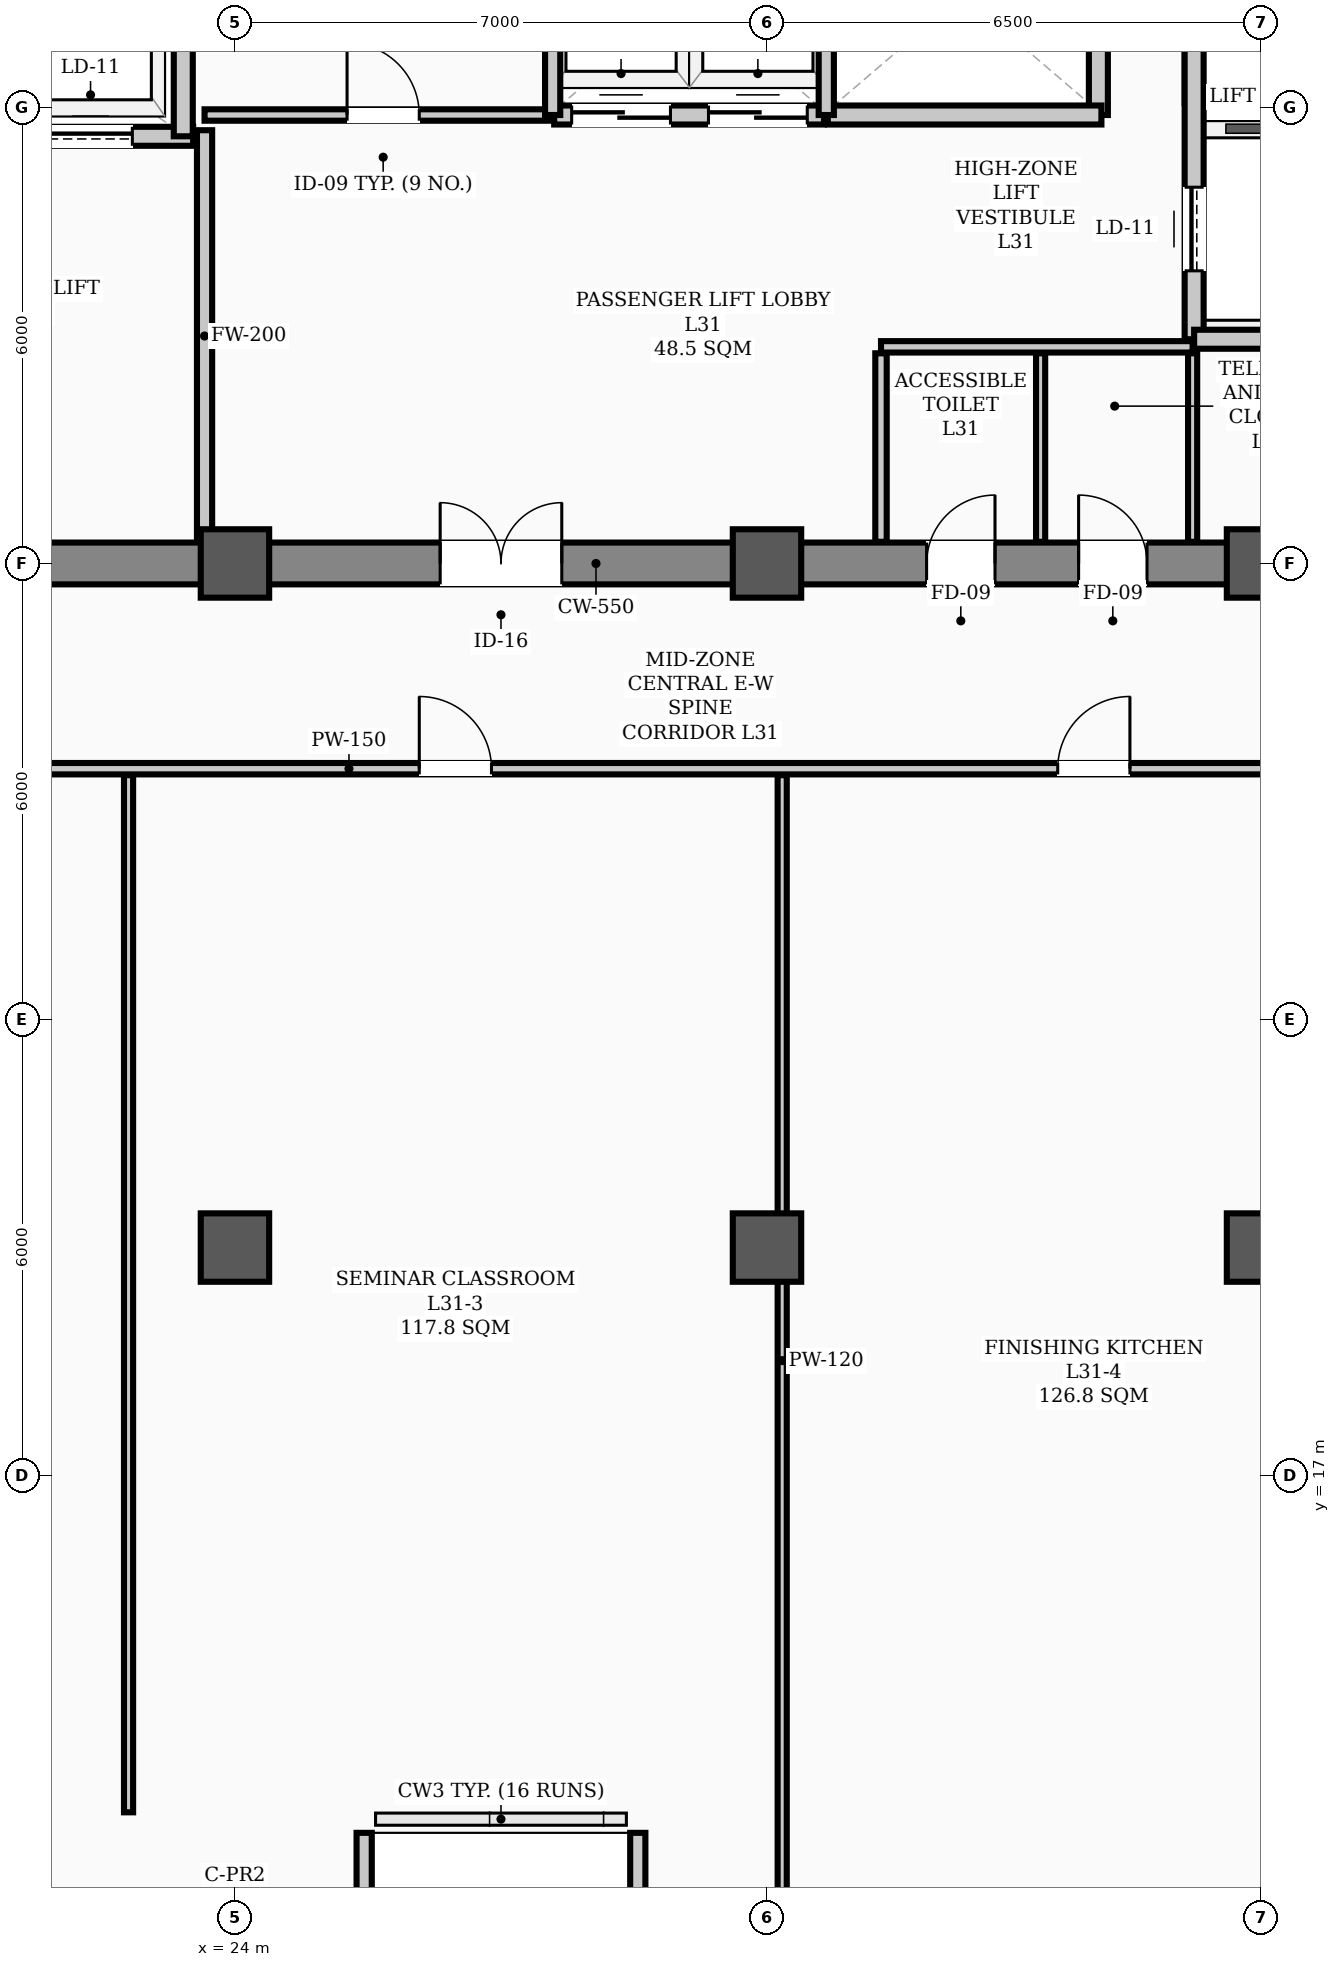
"""IFC4 building model, lengths in metres.
Left out: names, types, materials, properties, quantities, classifications, styles, units other than length and angle.
Written with IfcOpenShell. Run it as: python <this file> out.ifc"""

import sys

from ifc_helpers import new_model, si_unit, direction, frame, frame_2d, origin, origin_2d, place, context, subcontext, project, spatial, rectangle, hollow_rectangle, extrude, element, fill, save


model = new_model("IFC4")
c1 = context("Model", 3, precision=1e-05, world=origin(), true_north=direction((0.0, 1.0)))
c2 = subcontext(c1, "Body", "Model", "MODEL_VIEW")
j1 = project(units=[si_unit("LENGTHUNIT", "METRE"), si_unit("PLANEANGLEUNIT", "RADIAN")], contexts=[c1])
p1 = place(None, origin())
s1 = spatial("IfcSite", under=j1, at=p1, CompositionType="ELEMENT")
p2 = place(p1, origin())
s2 = spatial("IfcBuilding", under=s1, at=p2, CompositionType="ELEMENT")
p3 = place(p2, frame((0.0, 0.0, 126.6)))
s3 = spatial("IfcBuildingStorey", under=s2, at=p3, CompositionType="ELEMENT", Elevation=126.6)
for number, where, z_axis, x_axis in (
    (1, (24.0, 29.0, 0.0), (0.0, 0.0, 1.0), (1.0, 0.0, 0.0)),
    (2, (31.0, 29.0, 0.0), (0.0, 0.0, 1.0), (1.0, 0.0, 0.0)),
    (3, (37.5, 29.0, 0.0), (0.0, 0.0, 1.0), (1.0, 0.0, 0.0)),
    (4, (24.0, 20.0, 0.0), (0.0, 0.0, 1.0), (1.0, 0.0, 0.0)),
    (5, (31.0, 20.0, 0.0), (0.0, 0.0, 1.0), (1.0, 0.0, 0.0)),
    (6, (37.5, 20.0, 0.0), (0.0, 0.0, 1.0), (1.0, 0.0, 0.0)),
):
    element("IfcColumn", number, at=place(p3, frame(where, z_axis=z_axis, x_axis=x_axis)), inside=s3, PredefinedType="COLUMN", context=c2, shape_type="SweptSolid", body=[
        extrude(hollow_rectangle(XDim=0.9, YDim=0.9, WallThickness=0.035, InnerFilletRadius=0.017, OuterFilletRadius=0.052, at=origin_2d()), origin(), (0.0, 0.0, 1.0), 3.9),
    ])
for number, where, z_axis, x_axis in (
    (7, (25.7, 10.6, 0.0), (0.0, 0.0, 1.0), (0.0, 1.0, 0.0)),
    (8, (29.3, 12.3, 0.0), (0.0, 0.0, 1.0), (0.0, -1.0, 0.0)),
):
    element("IfcWall", number, at=place(p3, frame(where, z_axis=z_axis, x_axis=x_axis)), inside=s3, PredefinedType="PARAPET", context=c2, shape_type="SweptSolid", body=[
        extrude(rectangle(XDim=1.7, YDim=0.2, at=frame_2d((0.85, 0.0))), origin(), (0.0, 0.0, 1.0), 1.2),
    ])
p4 = place(p3, frame((13.5, 29.0, 0.0), z_axis=(0.0, 0.0, 1.0), x_axis=(1.0, 0.0, 0.0)))
e9 = element("IfcWall", 9, at=p4, inside=s3, PredefinedType="SHEAR", context=c2, shape_type="SweptSolid", body=[
    extrude(rectangle(XDim=30.5, YDim=0.55, at=frame_2d((15.25, 0.0))), origin(), (0.0, 0.0, 1.0), 3.72),
])
p5 = place(p4, frame((1.75, 0.0, 0.0)))
e10 = element("IfcOpeningElement", 10, at=p5, cuts=e9, PredefinedType="OPENING", context=c2, shape_type="SweptSolid", body=[
    extrude(rectangle(XDim=1.1, YDim=2.08, at=frame_2d((0.55, 1.04))), frame((0.0, 0.285, 0.0), z_axis=(0.0, -1.0, 0.0), x_axis=(1.0, 0.0, 0.0)), (0.0, 0.0, 1.0), 0.57),
])
p6 = place(p4, frame((26.7, 0.0, 0.0)))
e11 = element("IfcOpeningElement", 11, at=p6, cuts=e9, PredefinedType="OPENING", context=c2, shape_type="SweptSolid", body=[
    extrude(rectangle(XDim=1.1, YDim=2.08, at=frame_2d((0.55, 1.04))), frame((0.0, 0.285, 0.0), z_axis=(0.0, -1.0, 0.0), x_axis=(1.0, 0.0, 0.0)), (0.0, 0.0, 1.0), 0.57),
])
p7 = place(p4, frame((6.8, 0.0, 0.0)))
e12 = element("IfcOpeningElement", 12, at=p7, cuts=e9, PredefinedType="OPENING", context=c2, shape_type="SweptSolid", body=[
    extrude(rectangle(XDim=1.1, YDim=2.08, at=frame_2d((0.55, 1.04))), frame((0.0, 0.285, 0.0), z_axis=(0.0, -1.0, 0.0), x_axis=(1.0, 0.0, 0.0)), (0.0, 0.0, 1.0), 0.57),
])
p8 = place(p4, frame((13.2, 0.0, 0.0)))
e13 = element("IfcOpeningElement", 13, at=p8, cuts=e9, PredefinedType="OPENING", context=c2, shape_type="SweptSolid", body=[
    extrude(rectangle(XDim=1.6, YDim=2.08, at=frame_2d((0.8, 1.04))), frame((0.0, 0.285, 0.0), z_axis=(0.0, -1.0, 0.0), x_axis=(1.0, 0.0, 0.0)), (0.0, 0.0, 1.0), 0.57),
])
p9 = place(p4, frame((19.6, 0.0, 0.0)))
e14 = element("IfcOpeningElement", 14, at=p9, cuts=e9, PredefinedType="OPENING", context=c2, shape_type="SweptSolid", body=[
    extrude(rectangle(XDim=0.9, YDim=2.08, at=frame_2d((0.45, 1.04))), frame((0.0, 0.285, 0.0), z_axis=(0.0, -1.0, 0.0), x_axis=(1.0, 0.0, 0.0)), (0.0, 0.0, 1.0), 0.57),
])
p10 = place(p4, frame((21.6, 0.0, 0.0)))
e15 = element("IfcOpeningElement", 15, at=p10, cuts=e9, PredefinedType="OPENING", context=c2, shape_type="SweptSolid", body=[
    extrude(rectangle(XDim=0.9, YDim=2.08, at=frame_2d((0.45, 1.04))), frame((0.0, 0.285, 0.0), z_axis=(0.0, -1.0, 0.0), x_axis=(1.0, 0.0, 0.0)), (0.0, 0.0, 1.0), 0.57),
])
p11 = place(p3, frame((18.1, 34.62, 0.0), z_axis=(0.0, 0.0, 1.0), x_axis=(1.0, 0.0, 0.0)))
e16 = element("IfcWall", 16, at=p11, inside=s3, PredefinedType="STANDARD", context=c2, shape_type="SweptSolid", body=[
    extrude(rectangle(XDim=5.35, YDim=0.25, at=frame_2d((2.675, 0.0))), origin(), (0.0, 0.0, 1.0), 3.72),
])
p12 = place(p11, frame((0.85, 0.0, 0.0)))
e17 = element("IfcOpeningElement", 17, at=p12, cuts=e16, PredefinedType="OPENING", context=c2, shape_type="SweptSolid", body=[
    extrude(rectangle(XDim=1.1, YDim=2.08, at=frame_2d((0.55, 1.04))), frame((0.0, 0.135, 0.0), z_axis=(0.0, -1.0, 0.0), x_axis=(1.0, 0.0, 0.0)), (0.0, 0.0, 1.0), 0.27),
])
p13 = place(p11, frame((3.45, 0.0, 0.0)))
e18 = element("IfcOpeningElement", 18, at=p13, cuts=e16, PredefinedType="OPENING", context=c2, shape_type="SweptSolid", body=[
    extrude(rectangle(XDim=1.1, YDim=2.08, at=frame_2d((0.55, 1.04))), frame((0.0, 0.135, 0.0), z_axis=(0.0, -1.0, 0.0), x_axis=(1.0, 0.0, 0.0)), (0.0, 0.0, 1.0), 0.27),
])
p14 = place(p3, frame((36.62, 31.95, 0.0), z_axis=(0.0, 0.0, 1.0), x_axis=(0.0, 1.0, 0.0)))
e19 = element("IfcWall", 19, at=p14, inside=s3, PredefinedType="STANDARD", context=c2, shape_type="SweptSolid", body=[
    extrude(rectangle(XDim=6.0, YDim=0.25, at=frame_2d((3.0, 0.0))), origin(), (0.0, 0.0, 1.0), 3.72),
])
p15 = place(p14, frame((0.9, 0.0, 0.0)))
e20 = element("IfcOpeningElement", 20, at=p15, cuts=e19, PredefinedType="OPENING", context=c2, shape_type="SweptSolid", body=[
    extrude(rectangle(XDim=1.1, YDim=2.08, at=frame_2d((0.55, 1.04))), frame((0.0, 0.135, 0.0), z_axis=(0.0, -1.0, 0.0), x_axis=(1.0, 0.0, 0.0)), (0.0, 0.0, 1.0), 0.27),
])
p16 = place(p14, frame((4.0, 0.0, 0.0)))
e21 = element("IfcOpeningElement", 21, at=p16, cuts=e19, PredefinedType="OPENING", context=c2, shape_type="SweptSolid", body=[
    extrude(rectangle(XDim=1.1, YDim=2.08, at=frame_2d((0.55, 1.04))), frame((0.0, 0.135, 0.0), z_axis=(0.0, -1.0, 0.0), x_axis=(1.0, 0.0, 0.0)), (0.0, 0.0, 1.0), 0.27),
])
p17 = place(p3, frame((36.62, 31.95, 0.0), z_axis=(0.0, 0.0, 1.0), x_axis=(1.0, 0.0, 0.0)))
e22 = element("IfcWall", 22, at=p17, inside=s3, PredefinedType="STANDARD", context=c2, shape_type="SweptSolid", body=[
    extrude(rectangle(XDim=1.9, YDim=0.25, at=frame_2d((0.95, 0.0))), origin(), (0.0, 0.0, 1.0), 3.48),
])
p18 = place(p3, frame((23.32, 34.62, 0.0), z_axis=(0.0, 0.0, 1.0), x_axis=(0.0, 1.0, 0.0)))
e23 = element("IfcWall", 23, at=p18, inside=s3, PredefinedType="STANDARD", context=c2, shape_type="SweptSolid", body=[
    extrude(rectangle(XDim=3.33, YDim=0.25, at=frame_2d((1.665, 0.0))), origin(), (0.0, 0.0, 1.0), 3.72),
])
p19 = place(p3, frame((35.36, 34.9, 0.0), z_axis=(0.0, 0.0, 1.0), x_axis=(0.0, 1.0, 0.0)))
e24 = element("IfcWall", 24, at=p19, inside=s3, PredefinedType="STANDARD", context=c2, shape_type="SweptSolid", body=[
    extrude(rectangle(XDim=3.05, YDim=0.25, at=frame_2d((1.525, 0.0))), origin(), (0.0, 0.0, 1.0), 3.72),
])
p20 = place(p3, frame((28.2, 34.9, 0.0), z_axis=(0.0, 0.0, 1.0), x_axis=(1.0, 0.0, 0.0)))
e25 = element("IfcWall", 25, at=p20, inside=s3, PredefinedType="STANDARD", context=c2, shape_type="SweptSolid", body=[
    extrude(rectangle(XDim=3.55, YDim=0.25, at=frame_2d((1.775, 0.0))), origin(), (0.0, 0.0, 1.0), 3.72),
])
p21 = place(p20, frame((0.23, 0.0, 0.0)))
e26 = element("IfcOpeningElement", 26, at=p21, cuts=e25, PredefinedType="OPENING", context=c2, shape_type="SweptSolid", body=[
    extrude(rectangle(XDim=1.3, YDim=2.08, at=frame_2d((0.65, 1.04))), frame((0.0, 0.135, 0.0), z_axis=(0.0, -1.0, 0.0), x_axis=(1.0, 0.0, 0.0)), (0.0, 0.0, 1.0), 0.27),
])
p22 = place(p20, frame((2.03, 0.0, 0.0)))
e27 = element("IfcOpeningElement", 27, at=p22, cuts=e25, PredefinedType="OPENING", context=c2, shape_type="SweptSolid", body=[
    extrude(rectangle(XDim=1.3, YDim=2.08, at=frame_2d((0.65, 1.04))), frame((0.0, 0.135, 0.0), z_axis=(0.0, -1.0, 0.0), x_axis=(1.0, 0.0, 0.0)), (0.0, 0.0, 1.0), 0.27),
])
p23 = place(p3, frame((31.8, 34.9, 0.0), z_axis=(0.0, 0.0, 1.0), x_axis=(1.0, 0.0, 0.0)))
e28 = element("IfcWall", 28, at=p23, inside=s3, PredefinedType="STANDARD", context=c2, shape_type="SweptSolid", body=[
    extrude(rectangle(XDim=3.6, YDim=0.25, at=frame_2d((1.8, 0.0))), origin(), (0.0, 0.0, 1.0), 3.72),
])
p24 = place(p3, frame((23.6, 34.9, 0.0), z_axis=(0.0, 0.0, 1.0), x_axis=(1.0, 0.0, 0.0)))
e29 = element("IfcWall", 29, at=p24, inside=s3, PredefinedType="PARTITIONING", context=c2, shape_type="SweptSolid", body=[
    extrude(rectangle(XDim=4.58, YDim=0.15, at=frame_2d((2.29, 0.0))), origin(), (0.0, 0.0, 1.0), 3.72),
])
p25 = place(p24, frame((1.875, 0.0, 0.0)))
e30 = element("IfcOpeningElement", 30, at=p25, cuts=e29, PredefinedType="OPENING", context=c2, shape_type="SweptSolid", body=[
    extrude(rectangle(XDim=0.95, YDim=2.08, at=frame_2d((0.475, 1.04))), frame((0.0, 0.085, 0.0), z_axis=(0.0, -1.0, 0.0), x_axis=(1.0, 0.0, 0.0)), (0.0, 0.0, 1.0), 0.17),
])
p26 = place(p3, frame((32.5, 31.85, 0.0), z_axis=(0.0, 0.0, 1.0), x_axis=(1.0, 0.0, 0.0)))
e31 = element("IfcWall", 31, at=p26, inside=s3, PredefinedType="PARTITIONING", context=c2, shape_type="SweptSolid", body=[
    extrude(rectangle(XDim=4.1, YDim=0.15, at=frame_2d((2.05, 0.0))), origin(), (0.0, 0.0, 1.0), 3.72),
])
p27 = place(p3, frame((2.31, 26.3, 0.0), z_axis=(0.0, 0.0, 1.0), x_axis=(1.0, 0.0, 0.0)))
e32 = element("IfcWall", 32, at=p27, inside=s3, PredefinedType="PARTITIONING", context=c2, shape_type="SweptSolid", body=[
    extrude(rectangle(XDim=46.38, YDim=0.15, at=frame_2d((23.19, 0.0))), origin(), (0.0, 0.0, 1.0), 3.1),
])
p28 = place(p27, frame((10.19, 0.0, 0.0)))
e33 = element("IfcOpeningElement", 33, at=p28, cuts=e32, PredefinedType="OPENING", context=c2, shape_type="SweptSolid", body=[
    extrude(rectangle(XDim=0.95, YDim=2.08, at=frame_2d((0.475, 1.04))), frame((0.0, 0.085, 0.0), z_axis=(0.0, -1.0, 0.0), x_axis=(1.0, 0.0, 0.0)), (0.0, 0.0, 1.0), 0.17),
])
p29 = place(p27, frame((15.915, 0.0, 0.0)))
e34 = element("IfcOpeningElement", 34, at=p29, cuts=e32, PredefinedType="OPENING", context=c2, shape_type="SweptSolid", body=[
    extrude(rectangle(XDim=0.95, YDim=2.08, at=frame_2d((0.475, 1.04))), frame((0.0, 0.085, 0.0), z_axis=(0.0, -1.0, 0.0), x_axis=(1.0, 0.0, 0.0)), (0.0, 0.0, 1.0), 0.17),
])
p30 = place(p27, frame((24.115, 0.0, 0.0)))
e35 = element("IfcOpeningElement", 35, at=p30, cuts=e32, PredefinedType="OPENING", context=c2, shape_type="SweptSolid", body=[
    extrude(rectangle(XDim=0.95, YDim=2.08, at=frame_2d((0.475, 1.04))), frame((0.0, 0.085, 0.0), z_axis=(0.0, -1.0, 0.0), x_axis=(1.0, 0.0, 0.0)), (0.0, 0.0, 1.0), 0.17),
])
p31 = place(p27, frame((32.515, 0.0, 0.0)))
e36 = element("IfcOpeningElement", 36, at=p31, cuts=e32, PredefinedType="OPENING", context=c2, shape_type="SweptSolid", body=[
    extrude(rectangle(XDim=0.95, YDim=2.08, at=frame_2d((0.475, 1.04))), frame((0.0, 0.085, 0.0), z_axis=(0.0, -1.0, 0.0), x_axis=(1.0, 0.0, 0.0)), (0.0, 0.0, 1.0), 0.17),
])
p32 = place(p27, frame((37.665, 0.0, 0.0)))
e37 = element("IfcOpeningElement", 37, at=p32, cuts=e32, PredefinedType="OPENING", context=c2, shape_type="SweptSolid", body=[
    extrude(rectangle(XDim=0.95, YDim=2.08, at=frame_2d((0.475, 1.04))), frame((0.0, 0.085, 0.0), z_axis=(0.0, -1.0, 0.0), x_axis=(1.0, 0.0, 0.0)), (0.0, 0.0, 1.0), 0.17),
])
p33 = place(p3, frame((23.6, 29.285, 0.0), z_axis=(0.0, 0.0, 1.0), x_axis=(0.0, 1.0, 0.0)))
e38 = element("IfcWall", 38, at=p33, inside=s3, PredefinedType="STANDARD", context=c2, shape_type="SweptSolid", body=[
    extrude(rectangle(XDim=5.415, YDim=0.2, at=frame_2d((2.708, 0.0))), origin(), (0.0, 0.0, 1.0), 3.1),
])
p34 = place(p3, frame((32.5, 29.285, 0.0), z_axis=(0.0, 0.0, 1.0), x_axis=(0.0, 1.0, 0.0)))
e39 = element("IfcWall", 39, at=p34, inside=s3, PredefinedType="PARTITIONING", context=c2, shape_type="SweptSolid", body=[
    extrude(rectangle(XDim=2.48, YDim=0.15, at=frame_2d((1.24, 0.0))), origin(), (0.0, 0.0, 1.0), 3.3),
])
for number, where, z_axis, x_axis in (
    (40, (36.6, 29.285, 0.0), (0.0, 0.0, 1.0), (0.0, 1.0, 0.0)),
    (41, (34.6, 29.285, 0.0), (0.0, 0.0, 1.0), (0.0, 1.0, 0.0)),
):
    element("IfcWall", number, at=place(p3, frame(where, z_axis=z_axis, x_axis=x_axis)), inside=s3, PredefinedType="PARTITIONING", context=c2, shape_type="SweptSolid", body=[
        extrude(rectangle(XDim=2.48, YDim=0.12, at=frame_2d((1.24, 0.0))), origin(), (0.0, 0.0, 1.0), 3.3),
    ])
p35 = place(p3, frame((22.6, 12.57, 0.0), z_axis=(0.0, 0.0, 1.0), x_axis=(0.0, 1.0, 0.0)))
e42 = element("IfcWall", 42, at=p35, inside=s3, PredefinedType="PARTITIONING", context=c2, shape_type="SweptSolid", body=[
    extrude(rectangle(XDim=13.645, YDim=0.12, at=frame_2d((6.823, 0.0))), origin(), (0.0, 0.0, 1.0), 3.0),
])
p36 = place(p3, frame((31.2, 10.81, 0.0), z_axis=(0.0, 0.0, 1.0), x_axis=(0.0, 1.0, 0.0)))
e43 = element("IfcWall", 43, at=p36, inside=s3, PredefinedType="PARTITIONING", context=c2, shape_type="SweptSolid", body=[
    extrude(rectangle(XDim=15.405, YDim=0.12, at=frame_2d((7.703, 0.0))), origin(), (0.0, 0.0, 1.0), 3.0),
])
for number, where, z_axis, x_axis in (
    (44, (28.18, 34.9, 0.0), (0.0, 0.0, 1.0), (0.0, 1.0, 0.0)),
    (45, (31.78, 34.9, 0.0), (0.0, 0.0, 1.0), (0.0, 1.0, 0.0)),
):
    element("IfcWall", number, at=place(p3, frame(where, z_axis=z_axis, x_axis=x_axis)), inside=s3, PredefinedType="STANDARD", context=c2, shape_type="SweptSolid", body=[
        extrude(rectangle(XDim=3.12, YDim=0.2, at=frame_2d((1.56, 0.0))), origin(), (0.0, 0.0, 1.0), 3.72),
    ])
p37 = place(p8, origin())
e46 = element("IfcDoor", 46, at=p37, inside=s3, OperationType="DOUBLE_DOOR_SINGLE_SWING", PredefinedType="DOOR", context=c2, shape_type="SweptSolid", body=[
    extrude(rectangle(XDim=1.6, YDim=2.08, at=frame_2d((0.8, 1.04))), frame((0.0, 0.025, 0.0), z_axis=(0.0, -1.0, 0.0), x_axis=(1.0, 0.0, 0.0)), (0.0, 0.0, 1.0), 0.05),
])
fill(e13, e46)
p38 = place(p25, origin())
e47 = element("IfcDoor", 47, at=p38, inside=s3, OperationType="SINGLE_SWING_LEFT", PredefinedType="DOOR", context=c2, shape_type="SweptSolid", body=[
    extrude(rectangle(XDim=0.95, YDim=2.08, at=frame_2d((0.475, 1.04))), frame((0.0, 0.025, 0.0), z_axis=(0.0, -1.0, 0.0), x_axis=(1.0, 0.0, 0.0)), (0.0, 0.0, 1.0), 0.05),
])
fill(e30, e47)
p39 = place(p9, origin())
e48 = element("IfcDoor", 48, at=p39, inside=s3, OperationType="SINGLE_SWING_RIGHT", PredefinedType="DOOR", context=c2, shape_type="SweptSolid", body=[
    extrude(rectangle(XDim=0.9, YDim=2.08, at=frame_2d((0.45, 1.04))), frame((0.0, 0.025, 0.0), z_axis=(0.0, -1.0, 0.0), x_axis=(1.0, 0.0, 0.0)), (0.0, 0.0, 1.0), 0.05),
])
fill(e14, e48)
p40 = place(p10, origin())
e49 = element("IfcDoor", 49, at=p40, inside=s3, OperationType="SINGLE_SWING_LEFT", PredefinedType="DOOR", context=c2, shape_type="SweptSolid", body=[
    extrude(rectangle(XDim=0.9, YDim=2.08, at=frame_2d((0.45, 1.04))), frame((0.0, 0.025, 0.0), z_axis=(0.0, -1.0, 0.0), x_axis=(1.0, 0.0, 0.0)), (0.0, 0.0, 1.0), 0.05),
])
fill(e15, e49)
p41 = place(p30, origin())
e50 = element("IfcDoor", 50, at=p41, inside=s3, OperationType="SINGLE_SWING_LEFT", PredefinedType="DOOR", context=c2, shape_type="SweptSolid", body=[
    extrude(rectangle(XDim=0.95, YDim=2.08, at=frame_2d((0.475, 1.04))), frame((0.0, 0.025, 0.0), z_axis=(0.0, -1.0, 0.0), x_axis=(1.0, 0.0, 0.0)), (0.0, 0.0, 1.0), 0.05),
])
fill(e35, e50)
p42 = place(p31, origin())
e51 = element("IfcDoor", 51, at=p42, inside=s3, OperationType="SINGLE_SWING_RIGHT", PredefinedType="DOOR", context=c2, shape_type="SweptSolid", body=[
    extrude(rectangle(XDim=0.95, YDim=2.08, at=frame_2d((0.475, 1.04))), frame((0.0, 0.025, 0.0), z_axis=(0.0, -1.0, 0.0), x_axis=(1.0, 0.0, 0.0)), (0.0, 0.0, 1.0), 0.05),
])
fill(e36, e51)
p43 = place(p13, origin())
e52 = element("IfcDoor", 52, at=p43, inside=s3, OperationType="SLIDING_TO_LEFT", PredefinedType="DOOR", context=c2, shape_type="SweptSolid", body=[
    extrude(rectangle(XDim=1.1, YDim=2.08, at=frame_2d((0.55, 1.04))), frame((0.0, 0.025, 0.0), z_axis=(0.0, -1.0, 0.0), x_axis=(1.0, 0.0, 0.0)), (0.0, 0.0, 1.0), 0.05),
])
fill(e18, e52)
p44 = place(p15, origin())
e53 = element("IfcDoor", 53, at=p44, inside=s3, OperationType="SLIDING_TO_LEFT", PredefinedType="DOOR", context=c2, shape_type="SweptSolid", body=[
    extrude(rectangle(XDim=1.1, YDim=2.08, at=frame_2d((0.55, 1.04))), frame((0.0, 0.025, 0.0), z_axis=(0.0, -1.0, 0.0), x_axis=(1.0, 0.0, 0.0)), (0.0, 0.0, 1.0), 0.05),
])
fill(e20, e53)
p45 = place(p21, origin())
e54 = element("IfcDoor", 54, at=p45, inside=s3, OperationType="DOUBLE_DOOR_SLIDING", PredefinedType="DOOR", context=c2, shape_type="SweptSolid", body=[
    extrude(rectangle(XDim=1.3, YDim=2.08, at=frame_2d((0.65, 1.04))), frame((0.0, 0.025, 0.0), z_axis=(0.0, -1.0, 0.0), x_axis=(1.0, 0.0, 0.0)), (0.0, 0.0, 1.0), 0.05),
])
fill(e26, e54)
p46 = place(p22, origin())
e55 = element("IfcDoor", 55, at=p46, inside=s3, OperationType="DOUBLE_DOOR_SLIDING", PredefinedType="DOOR", context=c2, shape_type="SweptSolid", body=[
    extrude(rectangle(XDim=1.3, YDim=2.08, at=frame_2d((0.65, 1.04))), frame((0.0, 0.025, 0.0), z_axis=(0.0, -1.0, 0.0), x_axis=(1.0, 0.0, 0.0)), (0.0, 0.0, 1.0), 0.05),
])
fill(e27, e55)
save(model, sys.argv[1])
